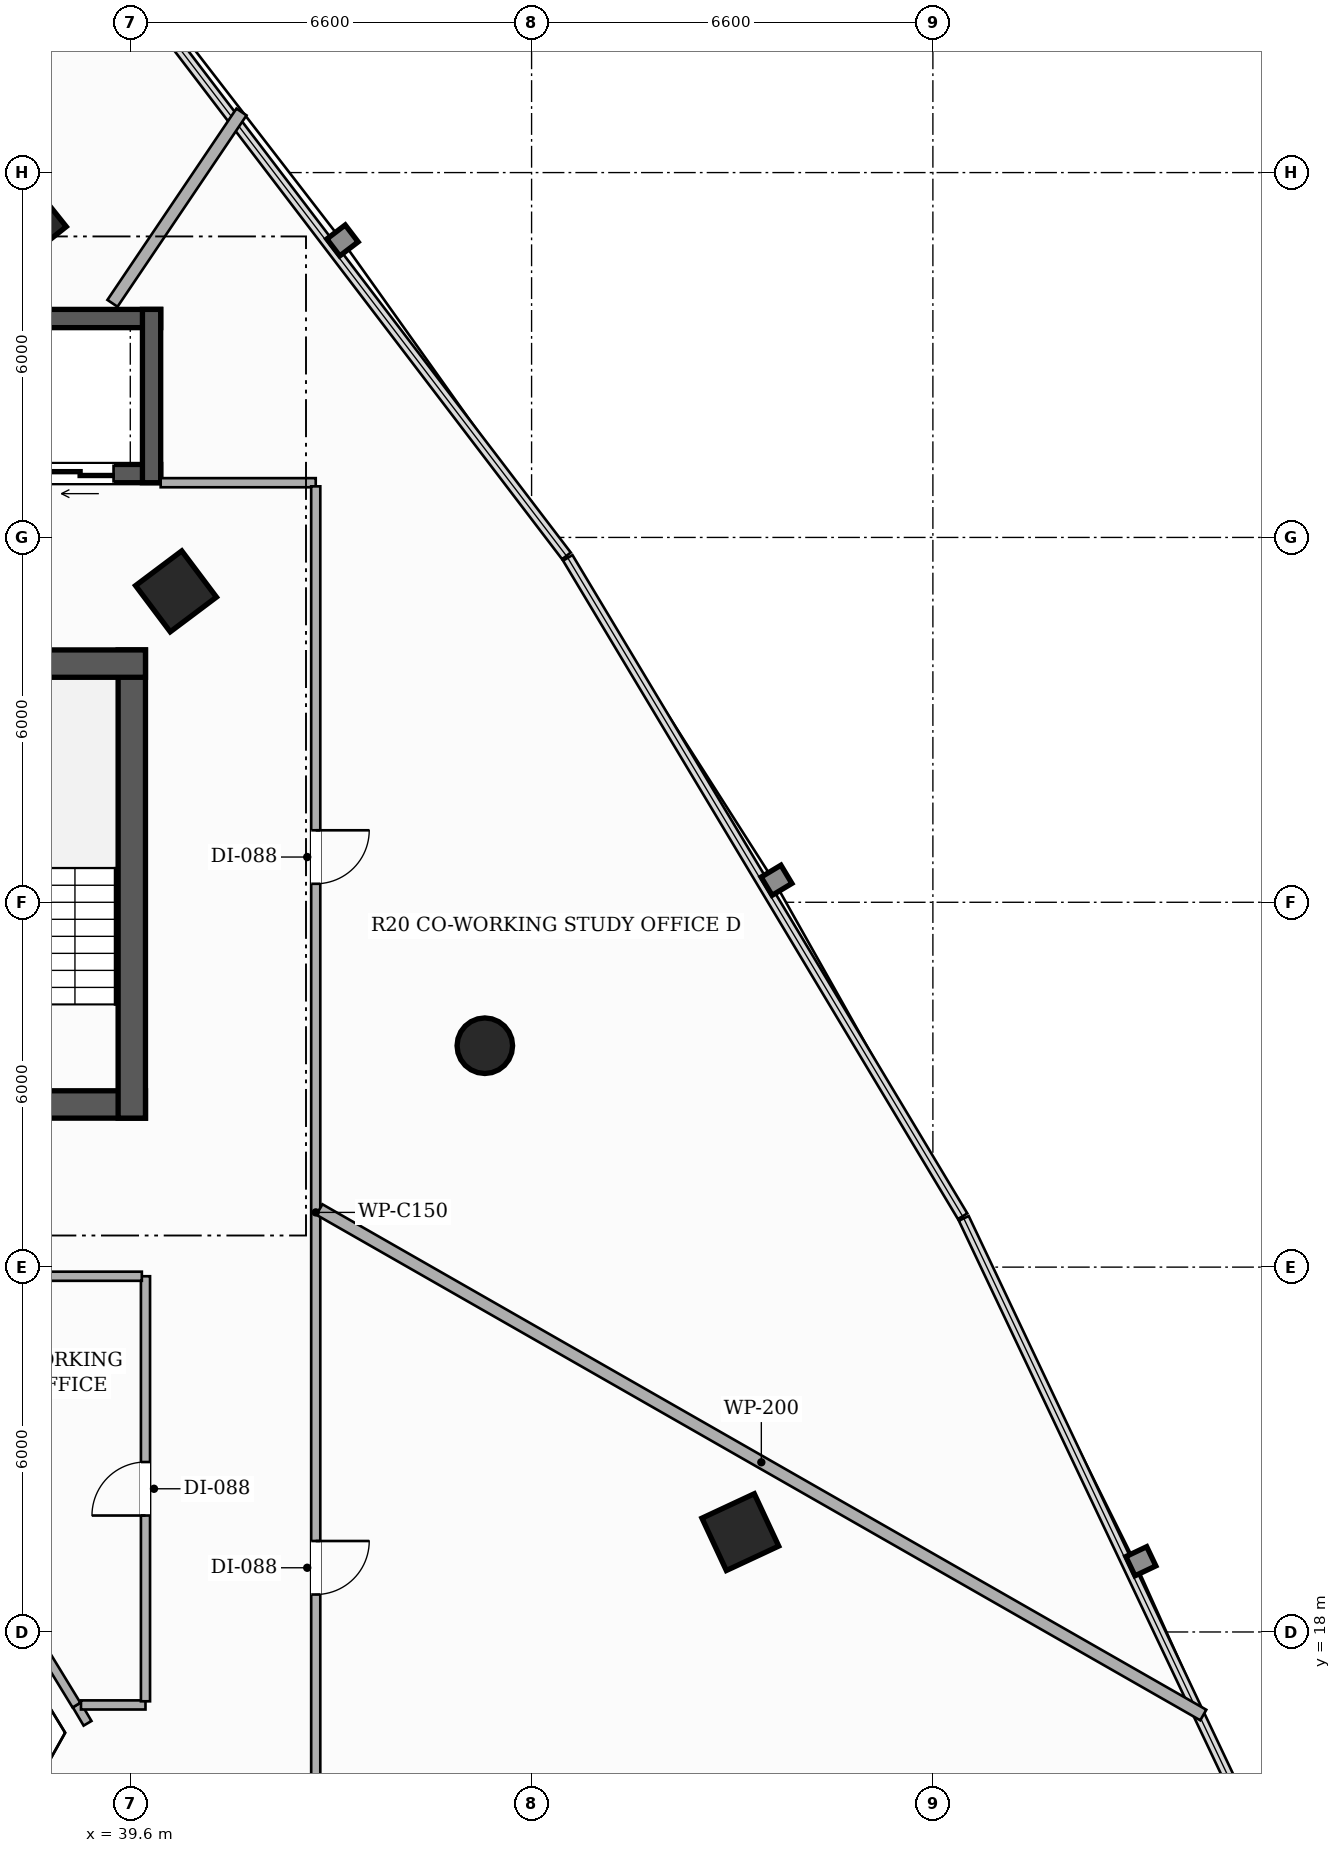
"""IFC4 building model, lengths in metres.
Left out: names, types, materials, properties, quantities, classifications, styles, units other than length and angle.
Written with IfcOpenShell. Run it as: python <this file> out.ifc"""

import sys

from ifc_helpers import new_model, si_unit, direction, frame, frame_2d, origin, origin_2d, place, context, subcontext, project, spatial, rectangle, hollow_rectangle, hollow_circle, extrude, element, fill, save


model = new_model("IFC4")
c1 = context("Model", 3, precision=1e-05, world=origin(), true_north=direction((0.0, 1.0)))
c2 = subcontext(c1, "Body", "Model", "MODEL_VIEW")
j1 = project(units=[si_unit("LENGTHUNIT", "METRE"), si_unit("PLANEANGLEUNIT", "RADIAN")], contexts=[c1])
p1 = place(None, origin())
s1 = spatial("IfcSite", under=j1, at=p1, CompositionType="ELEMENT")
p2 = place(p1, origin())
s2 = spatial("IfcBuilding", under=s1, at=p2, CompositionType="ELEMENT")
p3 = place(p2, frame((0.0, 0.0, 56.6)))
s3 = spatial("IfcBuildingStorey", under=s2, at=p3, CompositionType="ELEMENT", Elevation=56.6)
p4 = place(p3, frame((26.15, 26.675, 0.0), z_axis=(0.0, 0.0, 1.0), x_axis=(1.0, 0.0, 0.0)))
e1 = element("IfcWall", 1, at=p4, inside=s3, PredefinedType="SHEAR", context=c2, shape_type="SweptSolid", body=[
    extrude(rectangle(XDim=13.7, YDim=0.45, at=frame_2d((6.85, 0.0))), origin(), (0.0, 0.0, 1.0), 3.3),
])
p5 = place(p4, frame((4.35, 0.0, 0.0)))
e2 = element("IfcOpeningElement", 2, at=p5, cuts=e1, PredefinedType="OPENING", context=c2, shape_type="SweptSolid", body=[
    extrude(rectangle(XDim=1.05, YDim=2.15, at=frame_2d((0.525, 1.075))), frame((0.0, 0.235, 0.0), z_axis=(0.0, -1.0, 0.0), x_axis=(1.0, 0.0, 0.0)), (0.0, 0.0, 1.0), 0.47),
])
p6 = place(p4, frame((8.3, 0.0, 0.0)))
e3 = element("IfcOpeningElement", 3, at=p6, cuts=e1, PredefinedType="OPENING", context=c2, shape_type="SweptSolid", body=[
    extrude(rectangle(XDim=1.05, YDim=2.15, at=frame_2d((0.525, 1.075))), frame((0.0, 0.235, 0.0), z_axis=(0.0, -1.0, 0.0), x_axis=(1.0, 0.0, 0.0)), (0.0, 0.0, 1.0), 0.47),
])
p7 = place(p3, frame((39.625, 26.45, 0.0), z_axis=(0.0, 0.0, 1.0), x_axis=(0.0, 1.0, 0.0)))
e4 = element("IfcWall", 4, at=p7, inside=s3, PredefinedType="SHEAR", context=c2, shape_type="SweptSolid", body=[
    extrude(rectangle(XDim=7.7, YDim=0.45, at=frame_2d((3.85, 0.0))), origin(), (0.0, 0.0, 1.0), 3.3),
])
p8 = place(p3, frame((36.1, 33.925, 0.0), z_axis=(0.0, 0.0, 1.0), x_axis=(1.0, 0.0, 0.0)))
e5 = element("IfcWall", 5, at=p8, inside=s3, PredefinedType="SHEAR", context=c2, shape_type="SweptSolid", body=[
    extrude(rectangle(XDim=3.75, YDim=0.45, at=frame_2d((1.875, 0.0))), origin(), (0.0, 0.0, 1.0), 3.3),
])
p9 = place(p3, frame((40.1, 37.05, 0.0), z_axis=(0.0, 0.0, 1.0), x_axis=(-1.0, 0.0, 0.0)))
e6 = element("IfcWall", 6, at=p9, inside=s3, PredefinedType="SHEAR", context=c2, shape_type="SweptSolid", body=[
    extrude(rectangle(XDim=14.2, YDim=0.3, at=frame_2d((7.1, 0.0))), origin(), (0.0, 0.0, 1.0), 3.3),
])
p10 = place(p9, frame((12.325, 0.0, 0.0)))
e7 = element("IfcOpeningElement", 7, at=p10, cuts=e6, PredefinedType="OPENING", context=c2, shape_type="SweptSolid", body=[
    extrude(rectangle(XDim=1.1, YDim=2.2, at=frame_2d((0.55, 1.1))), frame((0.0, 0.16, 0.0), z_axis=(0.0, -1.0, 0.0), x_axis=(1.0, 0.0, 0.0)), (0.0, 0.0, 1.0), 0.32),
])
p11 = place(p9, frame((0.775, 0.0, 0.0)))
e8 = element("IfcOpeningElement", 8, at=p11, cuts=e6, PredefinedType="OPENING", context=c2, shape_type="SweptSolid", body=[
    extrude(rectangle(XDim=1.1, YDim=2.2, at=frame_2d((0.55, 1.1))), frame((0.0, 0.16, 0.0), z_axis=(0.0, -1.0, 0.0), x_axis=(1.0, 0.0, 0.0)), (0.0, 0.0, 1.0), 0.32),
])
p12 = place(p3, frame((25.9, 39.6, 0.0), z_axis=(0.0, 0.0, 1.0), x_axis=(1.0, 0.0, 0.0)))
e9 = element("IfcWall", 9, at=p12, inside=s3, PredefinedType="SHEAR", context=c2, shape_type="SweptSolid", body=[
    extrude(rectangle(XDim=14.2, YDim=0.3, at=frame_2d((7.1, 0.0))), origin(), (0.0, 0.0, 1.0), 3.3),
])
p13 = place(p3, frame((39.95, 36.9, 0.0), z_axis=(0.0, 0.0, 1.0), x_axis=(0.0, 1.0, 0.0)))
e10 = element("IfcWall", 10, at=p13, inside=s3, PredefinedType="SHEAR", context=c2, shape_type="SweptSolid", body=[
    extrude(rectangle(XDim=2.85, YDim=0.3, at=frame_2d((1.425, 0.0))), origin(), (0.0, 0.0, 1.0), 3.3),
])
p14 = place(p3, frame((49.633, 19.642, 0.0), z_axis=(0.0, 0.0, 1.0), x_axis=(-0.422618261741, 0.906307787037, 0.0)))
e11 = element("IfcColumn", 11, at=p14, inside=s3, PredefinedType="COLUMN", context=c2, shape_type="SweptSolid", body=[
    extrude(hollow_rectangle(XDim=0.95, YDim=0.95, WallThickness=0.032, at=origin_2d()), origin(), (0.0, 0.0, 1.0), 3.3),
])
p15 = place(p3, frame((45.431, 27.641, 0.0), z_axis=(0.0, 0.0, 1.0), x_axis=(1.0, 0.0, 0.0)))
e12 = element("IfcColumn", 12, at=p15, inside=s3, PredefinedType="COLUMN", context=c2, shape_type="SweptSolid", body=[
    extrude(hollow_circle(Radius=0.457, WallThickness=0.025, at=origin_2d()), origin(), (0.0, 0.0, 1.0), 3.3),
])
p16 = place(p3, frame((40.352, 35.113, 0.0), z_axis=(0.0, 0.0, 1.0), x_axis=(-0.600420225326, 0.799684658487, 0.0)))
e13 = element("IfcColumn", 13, at=p16, inside=s3, PredefinedType="COLUMN", context=c2, shape_type="SweptSolid", body=[
    extrude(hollow_rectangle(XDim=0.95, YDim=0.95, WallThickness=0.032, at=origin_2d()), origin(), (0.0, 0.0, 1.0), 3.3),
])
p17 = place(p3, frame((37.95, 41.178, 0.0), z_axis=(0.0, 0.0, 1.0), x_axis=(-0.623879596709, 0.781520472419, 0.0)))
e14 = element("IfcColumn", 14, at=p17, inside=s3, PredefinedType="COLUMN", context=c2, shape_type="SweptSolid", body=[
    extrude(hollow_rectangle(XDim=0.85, YDim=0.85, WallThickness=0.028, at=origin_2d()), origin(), (0.0, 0.0, 1.0), 3.3),
])
p18 = place(p3, frame((40.1, 36.9, 0.0), z_axis=(0.0, 0.0, 1.0), x_axis=(1.0, 0.0, 0.0)))
e15 = element("IfcWall", 15, at=p18, inside=s3, PredefinedType="PARTITIONING", context=c2, shape_type="SweptSolid", body=[
    extrude(rectangle(XDim=2.55, YDim=0.15, at=frame_2d((1.275, 0.0))), origin(), (0.0, 0.0, 1.0), 2.373),
])
p19 = place(p3, frame((42.65, 36.84, 0.0), z_axis=(0.0, 0.0, 1.0), x_axis=(0.0, -1.0, 0.0)))
e16 = element("IfcWall", 16, at=p19, inside=s3, PredefinedType="PARTITIONING", context=c2, shape_type="SweptSolid", body=[
    extrude(rectangle(XDim=25.04, YDim=0.15, at=frame_2d((12.52, 0.0))), origin(), (0.0, 0.0, 1.0), 2.373),
])
p20 = place(p19, frame((17.344, 0.0, 0.0)))
e17 = element("IfcOpeningElement", 17, at=p20, cuts=e16, PredefinedType="OPENING", context=c2, shape_type="SweptSolid", body=[
    extrude(rectangle(XDim=0.88, YDim=2.1, at=frame_2d((0.44, 1.05))), frame((0.0, 0.085, 0.0), z_axis=(0.0, -1.0, 0.0), x_axis=(1.0, 0.0, 0.0)), (0.0, 0.0, 1.0), 0.17),
])
p21 = place(p19, frame((5.656, 0.0, 0.0)))
e18 = element("IfcOpeningElement", 18, at=p21, cuts=e16, PredefinedType="OPENING", context=c2, shape_type="SweptSolid", body=[
    extrude(rectangle(XDim=0.88, YDim=2.1, at=frame_2d((0.44, 1.05))), frame((0.0, 0.085, 0.0), z_axis=(0.0, -1.0, 0.0), x_axis=(1.0, 0.0, 0.0)), (0.0, 0.0, 1.0), 0.17),
])
p22 = place(p3, frame((38.897, 16.498, 0.0), z_axis=(0.0, 0.0, 1.0), x_axis=(-0.507720001023, 0.861522141654, 0.0)))
e19 = element("IfcWall", 19, at=p22, inside=s3, PredefinedType="PARTITIONING", context=c2, shape_type="SweptSolid", body=[
    extrude(rectangle(XDim=0.351, YDim=0.15, at=frame_2d((0.175, 0.0))), origin(), (0.0, 0.0, 1.0), 3.02),
])
p23 = place(p3, frame((38.789, 16.8, 0.0), z_axis=(0.0, 0.0, 1.0), x_axis=(1.0, 0.0, 0.0)))
e20 = element("IfcWall", 20, at=p23, inside=s3, PredefinedType="PARTITIONING", context=c2, shape_type="SweptSolid", body=[
    extrude(rectangle(XDim=1.061, YDim=0.15, at=frame_2d((0.531, 0.0))), origin(), (0.0, 0.0, 1.0), 3.02),
])
p24 = place(p3, frame((39.85, 16.86, 0.0), z_axis=(0.0, 0.0, 1.0), x_axis=(0.0, 1.0, 0.0)))
e21 = element("IfcWall", 21, at=p24, inside=s3, PredefinedType="PARTITIONING", context=c2, shape_type="SweptSolid", body=[
    extrude(rectangle(XDim=6.99, YDim=0.15, at=frame_2d((3.495, 0.0))), origin(), (0.0, 0.0, 1.0), 2.629),
])
p25 = place(p24, frame((3.055, 0.0, 0.0)))
e22 = element("IfcOpeningElement", 22, at=p25, cuts=e21, PredefinedType="OPENING", context=c2, shape_type="SweptSolid", body=[
    extrude(rectangle(XDim=0.88, YDim=2.1, at=frame_2d((0.44, 1.05))), frame((0.0, 0.085, 0.0), z_axis=(0.0, -1.0, 0.0), x_axis=(1.0, 0.0, 0.0)), (0.0, 0.0, 1.0), 0.17),
])
p26 = place(p3, frame((39.79, 23.85, 0.0), z_axis=(0.0, 0.0, 1.0), x_axis=(-1.0, 0.0, 0.0)))
e23 = element("IfcWall", 23, at=p26, inside=s3, PredefinedType="PARTITIONING", context=c2, shape_type="SweptSolid", body=[
    extrude(rectangle(XDim=5.381, YDim=0.15, at=frame_2d((2.69, 0.0))), origin(), (0.0, 0.0, 1.0), 2.629),
])
p27 = place(p3, frame((34.445, 23.79, 0.0), z_axis=(0.0, 0.0, 1.0), x_axis=(0.521145044988, -0.853468125992, 0.0)))
e24 = element("IfcWall", 24, at=p27, inside=s3, PredefinedType="PARTITIONING", context=c2, shape_type="SweptSolid", body=[
    extrude(rectangle(XDim=8.194, YDim=0.15, at=frame_2d((4.097, 0.0))), origin(), (0.0, 0.0, 1.0), 2.629),
])
p28 = place(p3, frame((42.71, 24.947, 0.0), z_axis=(0.0, 0.0, 1.0), x_axis=(0.868086992596, -0.49641210026, 0.0)))
e25 = element("IfcWall", 25, at=p28, inside=s3, PredefinedType="PARTITIONING", context=c2, shape_type="SweptSolid", body=[
    extrude(rectangle(XDim=16.746, YDim=0.2, at=frame_2d((8.373, 0.0))), origin(), (0.0, 0.0, 1.0), 2.373),
])
p29 = place(p3, frame((41.429, 42.997, 0.0), z_axis=(0.0, 0.0, 1.0), x_axis=(-0.559086144532, -0.829109572368, 0.0)))
e26 = element("IfcWall", 26, at=p29, inside=s3, PredefinedType="PARTITIONING", context=c2, shape_type="SweptSolid", body=[
    extrude(rectangle(XDim=3.796, YDim=0.2, at=frame_2d((1.898, 0.0))), origin(), (0.0, 0.0, 1.0), 3.02),
])
p30 = place(p11, origin())
e27 = element("IfcDoor", 27, at=p30, inside=s3, OperationType="DOUBLE_DOOR_SLIDING", PredefinedType="DOOR", context=c2, shape_type="SweptSolid", body=[
    extrude(rectangle(XDim=1.1, YDim=2.2, at=frame_2d((0.55, 1.1))), frame((0.0, 0.025, 0.0), z_axis=(0.0, -1.0, 0.0), x_axis=(1.0, 0.0, 0.0)), (0.0, 0.0, 1.0), 0.05),
])
fill(e8, e27)
p31 = place(p20, origin())
e28 = element("IfcDoor", 28, at=p31, inside=s3, OperationType="SINGLE_SWING_LEFT", PredefinedType="DOOR", context=c2, shape_type="SweptSolid", body=[
    extrude(rectangle(XDim=0.88, YDim=2.1, at=frame_2d((0.44, 1.05))), frame((0.0, 0.025, 0.0), z_axis=(0.0, -1.0, 0.0), x_axis=(1.0, 0.0, 0.0)), (0.0, 0.0, 1.0), 0.05),
])
fill(e17, e28)
p32 = place(p21, origin())
e29 = element("IfcDoor", 29, at=p32, inside=s3, OperationType="SINGLE_SWING_LEFT", PredefinedType="DOOR", context=c2, shape_type="SweptSolid", body=[
    extrude(rectangle(XDim=0.88, YDim=2.1, at=frame_2d((0.44, 1.05))), frame((0.0, 0.025, 0.0), z_axis=(0.0, -1.0, 0.0), x_axis=(1.0, 0.0, 0.0)), (0.0, 0.0, 1.0), 0.05),
])
fill(e18, e29)
p33 = place(p25, origin())
e30 = element("IfcDoor", 30, at=p33, inside=s3, OperationType="SINGLE_SWING_LEFT", PredefinedType="DOOR", context=c2, shape_type="SweptSolid", body=[
    extrude(rectangle(XDim=0.88, YDim=2.1, at=frame_2d((0.44, 1.05))), frame((0.0, 0.025, 0.0), z_axis=(0.0, -1.0, 0.0), x_axis=(1.0, 0.0, 0.0)), (0.0, 0.0, 1.0), 0.05),
])
fill(e22, e30)
save(model, sys.argv[1])
